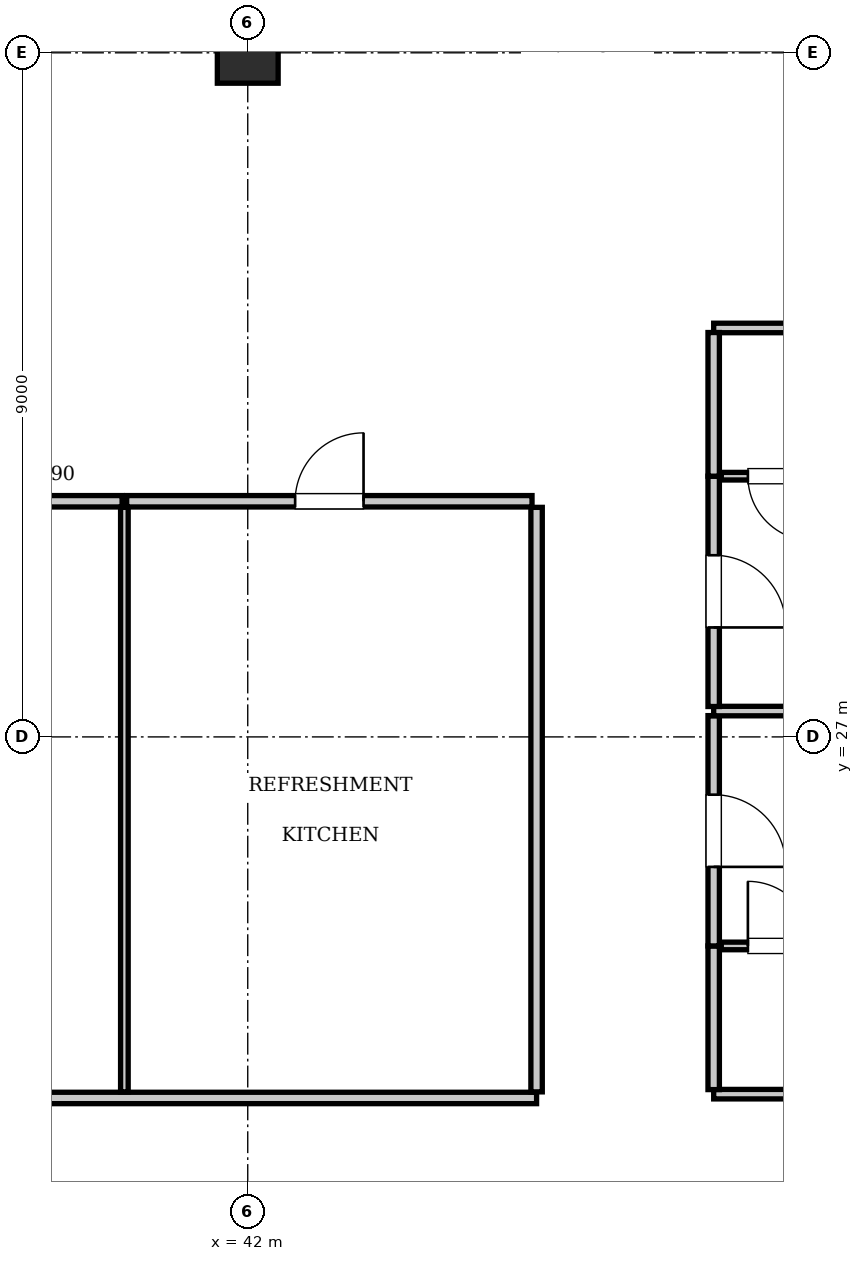
"""IFC4 building model, lengths in metres.
Left out: names, types, materials, properties, quantities, classifications, styles, units other than length and angle.
Written with IfcOpenShell. Run it as: python <this file> out.ifc"""

import sys

from ifc_helpers import new_model, si_unit, direction, frame, frame_2d, origin, origin_2d, place, context, subcontext, project, spatial, rectangle, extrude, element, fill, save


model = new_model("IFC4")
c1 = context("Model", 3, precision=1e-05, world=origin(), true_north=direction((0.0, 1.0)))
c2 = subcontext(c1, "Body", "Model", "MODEL_VIEW")
j1 = project(units=[si_unit("LENGTHUNIT", "METRE"), si_unit("PLANEANGLEUNIT", "RADIAN")], contexts=[c1])
p1 = place(None, origin())
s1 = spatial("IfcSite", under=j1, at=p1, CompositionType="ELEMENT")
p2 = place(p1, origin())
s2 = spatial("IfcBuilding", under=s1, at=p2, CompositionType="ELEMENT")
p3 = place(p2, frame((0.0, 0.0, 293.3)))
s3 = spatial("IfcBuildingStorey", under=s2, at=p3, CompositionType="ELEMENT", Elevation=293.3)
p4 = place(p3, frame((42.0, 36.0, 0.0), z_axis=(0.0, 0.0, 1.0), x_axis=(1.0, 0.0, 0.0)))
e1 = element("IfcColumn", 1, at=p4, inside=s3, PredefinedType="COLUMN", context=c2, shape_type="SweptSolid", body=[
    extrude(rectangle(XDim=0.8, YDim=0.8, at=origin_2d()), origin(), (0.0, 0.0, 1.0), 3.85),
])
p5 = place(p3, frame((29.85, 22.25, 0.0), z_axis=(0.0, 0.0, 1.0), x_axis=(1.0, 0.0, 0.0)))
e2 = element("IfcWall", 2, at=p5, inside=s3, PredefinedType="PARTITIONING", context=c2, shape_type="SweptSolid", body=[
    extrude(rectangle(XDim=15.95, YDim=0.15, at=frame_2d((7.975, 0.0))), origin(), (0.0, 0.0, 1.0), 3.61),
])
p6 = place(p3, frame((45.8, 22.33, 0.0), z_axis=(0.0, 0.0, 1.0), x_axis=(0.0, 1.0, 0.0)))
e3 = element("IfcWall", 3, at=p6, inside=s3, PredefinedType="PARTITIONING", context=c2, shape_type="SweptSolid", body=[
    extrude(rectangle(XDim=7.69, YDim=0.15, at=frame_2d((3.845, 0.0))), origin(), (0.0, 0.0, 1.0), 3.61),
])
p7 = place(p3, frame((35.941, 30.1, 0.0), z_axis=(0.0, 0.0, 1.0), x_axis=(1.0, 0.0, 0.0)))
e4 = element("IfcWall", 4, at=p7, inside=s3, PredefinedType="PARTITIONING", context=c2, shape_type="SweptSolid", body=[
    extrude(rectangle(XDim=4.406, YDim=0.15, at=frame_2d((2.203, 0.0))), origin(), (0.0, 0.0, 1.0), 3.61),
])
p8 = place(p7, frame((1.753, 0.0, 0.0)))
e5 = element("IfcOpeningElement", 5, at=p8, cuts=e4, PredefinedType="OPENING", context=c2, shape_type="SweptSolid", body=[
    extrude(rectangle(XDim=0.9, YDim=2.1, at=frame_2d((0.45, 1.05))), frame((0.0, 0.085, 0.0), z_axis=(0.0, -1.0, 0.0), x_axis=(1.0, 0.0, 0.0)), (0.0, 0.0, 1.0), 0.17),
])
p9 = place(p3, frame((40.377, 22.33, 0.0), z_axis=(0.0, 0.0, 1.0), x_axis=(0.0, 1.0, 0.0)))
e6 = element("IfcWall", 6, at=p9, inside=s3, PredefinedType="PARTITIONING", context=c2, shape_type="SweptSolid", body=[
    extrude(rectangle(XDim=7.69, YDim=0.1, at=frame_2d((3.845, 0.0))), origin(), (0.0, 0.0, 1.0), 3.61),
])
p10 = place(p3, frame((40.407, 30.1, 0.0), z_axis=(0.0, 0.0, 1.0), x_axis=(1.0, 0.0, 0.0)))
e7 = element("IfcWall", 7, at=p10, inside=s3, PredefinedType="PARTITIONING", context=c2, shape_type="SweptSolid", body=[
    extrude(rectangle(XDim=5.333, YDim=0.15, at=frame_2d((2.667, 0.0))), origin(), (0.0, 0.0, 1.0), 3.61),
])
p11 = place(p10, frame((2.217, 0.0, 0.0)))
e8 = element("IfcOpeningElement", 8, at=p11, cuts=e7, PredefinedType="OPENING", context=c2, shape_type="SweptSolid", body=[
    extrude(rectangle(XDim=0.9, YDim=2.1, at=frame_2d((0.45, 1.05))), frame((0.0, 0.085, 0.0), z_axis=(0.0, -1.0, 0.0), x_axis=(1.0, 0.0, 0.0)), (0.0, 0.0, 1.0), 0.17),
])
for number, where, z_axis, x_axis in (
    (9, (48.13, 22.3, 0.0), (0.0, 0.0, 1.0), (1.0, 0.0, 0.0)),
    (10, (48.13, 32.38, 0.0), (0.0, 0.0, 1.0), (1.0, 0.0, 0.0)),
):
    element("IfcWall", number, at=place(p3, frame(where, z_axis=z_axis, x_axis=x_axis)), inside=s3, PredefinedType="PARTITIONING", context=c2, shape_type="SweptSolid", body=[
        extrude(rectangle(XDim=11.97, YDim=0.125, at=frame_2d((5.985, 0.0))), origin(), (0.0, 0.0, 1.0), 3.61),
    ])
p12 = place(p3, frame((48.13, 22.36, 0.0), z_axis=(0.0, 0.0, 1.0), x_axis=(0.0, 1.0, 0.0)))
e11 = element("IfcWall", 11, at=p12, inside=s3, PredefinedType="PARTITIONING", context=c2, shape_type="SweptSolid", body=[
    extrude(rectangle(XDim=1.89, YDim=0.15, at=frame_2d((0.945, 0.0))), origin(), (0.0, 0.0, 1.0), 3.61),
])
p13 = place(p3, frame((48.13, 24.25, 0.0), z_axis=(0.0, 0.0, 1.0), x_axis=(0.0, 1.0, 0.0)))
e12 = element("IfcWall", 12, at=p13, inside=s3, PredefinedType="PARTITIONING", context=c2, shape_type="SweptSolid", body=[
    extrude(rectangle(XDim=3.03, YDim=0.15, at=frame_2d((1.515, 0.0))), origin(), (0.0, 0.0, 1.0), 3.61),
])
p14 = place(p13, frame((1.04, 0.0, 0.0)))
e13 = element("IfcOpeningElement", 13, at=p14, cuts=e12, PredefinedType="OPENING", context=c2, shape_type="SweptSolid", body=[
    extrude(rectangle(XDim=0.95, YDim=2.15, at=frame_2d((0.475, 1.075))), frame((0.0, 0.085, 0.0), z_axis=(0.0, -1.0, 0.0), x_axis=(1.0, 0.0, 0.0)), (0.0, 0.0, 1.0), 0.17),
])
p15 = place(p3, frame((48.23, 24.25, 0.0), z_axis=(0.0, 0.0, 1.0), x_axis=(1.0, 0.0, 0.0)))
e14 = element("IfcWall", 14, at=p15, inside=s3, PredefinedType="PARTITIONING", context=c2, shape_type="SweptSolid", body=[
    extrude(rectangle(XDim=2.3, YDim=0.1, at=frame_2d((1.15, 0.0))), origin(), (0.0, 0.0, 1.0), 3.61),
])
p16 = place(p15, frame((0.35, 0.0, 0.0)))
e15 = element("IfcOpeningElement", 15, at=p16, cuts=e14, PredefinedType="OPENING", context=c2, shape_type="SweptSolid", body=[
    extrude(rectangle(XDim=0.85, YDim=2.1, at=frame_2d((0.425, 1.05))), frame((0.0, 0.06, 0.0), z_axis=(0.0, -1.0, 0.0), x_axis=(1.0, 0.0, 0.0)), (0.0, 0.0, 1.0), 0.12),
])
p17 = place(p3, frame((48.13, 27.34, 0.0), z_axis=(0.0, 0.0, 1.0), x_axis=(1.0, 0.0, 0.0)))
e16 = element("IfcWall", 16, at=p17, inside=s3, PredefinedType="PARTITIONING", context=c2, shape_type="SweptSolid", body=[
    extrude(rectangle(XDim=11.97, YDim=0.125, at=frame_2d((5.985, 0.0))), origin(), (0.0, 0.0, 1.0), 3.61),
])
p18 = place(p3, frame((48.13, 27.4, 0.0), z_axis=(0.0, 0.0, 1.0), x_axis=(0.0, 1.0, 0.0)))
e17 = element("IfcWall", 17, at=p18, inside=s3, PredefinedType="PARTITIONING", context=c2, shape_type="SweptSolid", body=[
    extrude(rectangle(XDim=3.03, YDim=0.15, at=frame_2d((1.515, 0.0))), origin(), (0.0, 0.0, 1.0), 3.61),
])
p19 = place(p18, frame((1.04, 0.0, 0.0)))
e18 = element("IfcOpeningElement", 18, at=p19, cuts=e17, PredefinedType="OPENING", context=c2, shape_type="SweptSolid", body=[
    extrude(rectangle(XDim=0.95, YDim=2.15, at=frame_2d((0.475, 1.075))), frame((0.0, 0.085, 0.0), z_axis=(0.0, -1.0, 0.0), x_axis=(1.0, 0.0, 0.0)), (0.0, 0.0, 1.0), 0.17),
])
p20 = place(p3, frame((48.13, 30.43, 0.0), z_axis=(0.0, 0.0, 1.0), x_axis=(0.0, 1.0, 0.0)))
e19 = element("IfcWall", 19, at=p20, inside=s3, PredefinedType="PARTITIONING", context=c2, shape_type="SweptSolid", body=[
    extrude(rectangle(XDim=1.89, YDim=0.15, at=frame_2d((0.945, 0.0))), origin(), (0.0, 0.0, 1.0), 3.61),
])
p21 = place(p3, frame((48.23, 30.43, 0.0), z_axis=(0.0, 0.0, 1.0), x_axis=(1.0, 0.0, 0.0)))
e20 = element("IfcWall", 20, at=p21, inside=s3, PredefinedType="PARTITIONING", context=c2, shape_type="SweptSolid", body=[
    extrude(rectangle(XDim=2.3, YDim=0.1, at=frame_2d((1.15, 0.0))), origin(), (0.0, 0.0, 1.0), 3.61),
])
p22 = place(p21, frame((0.35, 0.0, 0.0)))
e21 = element("IfcOpeningElement", 21, at=p22, cuts=e20, PredefinedType="OPENING", context=c2, shape_type="SweptSolid", body=[
    extrude(rectangle(XDim=0.85, YDim=2.1, at=frame_2d((0.425, 1.05))), frame((0.0, 0.06, 0.0), z_axis=(0.0, -1.0, 0.0), x_axis=(1.0, 0.0, 0.0)), (0.0, 0.0, 1.0), 0.12),
])
p23 = place(p11, origin())
e22 = element("IfcDoor", 22, at=p23, inside=s3, OperationType="SINGLE_SWING_RIGHT", PredefinedType="DOOR", context=c2, shape_type="SweptSolid", body=[
    extrude(rectangle(XDim=0.9, YDim=2.1, at=frame_2d((0.45, 1.05))), frame((0.0, 0.025, 0.0), z_axis=(0.0, -1.0, 0.0), x_axis=(1.0, 0.0, 0.0)), (0.0, 0.0, 1.0), 0.05),
])
fill(e8, e22)
p24 = place(p16, origin())
e23 = element("IfcDoor", 23, at=p24, inside=s3, OperationType="SINGLE_SWING_LEFT", PredefinedType="DOOR", context=c2, shape_type="SweptSolid", body=[
    extrude(rectangle(XDim=0.85, YDim=2.1, at=frame_2d((0.425, 1.05))), frame((0.0, 0.025, 0.0), z_axis=(0.0, -1.0, 0.0), x_axis=(1.0, 0.0, 0.0)), (0.0, 0.0, 1.0), 0.05),
])
fill(e15, e23)
p25 = place(p14, frame((0.95, 0.0, 0.0), z_axis=(0.0, 0.0, 1.0), x_axis=(-1.0, 0.0, 0.0)))
e24 = element("IfcDoor", 24, at=p25, inside=s3, OperationType="SINGLE_SWING_RIGHT", PredefinedType="DOOR", context=c2, shape_type="SweptSolid", body=[
    extrude(rectangle(XDim=0.95, YDim=2.15, at=frame_2d((0.475, 1.075))), frame((0.0, 0.025, 0.0), z_axis=(0.0, -1.0, 0.0), x_axis=(1.0, 0.0, 0.0)), (0.0, 0.0, 1.0), 0.05),
])
fill(e13, e24)
p26 = place(p22, frame((0.85, 0.0, 0.0), z_axis=(0.0, 0.0, 1.0), x_axis=(-1.0, 0.0, 0.0)))
e25 = element("IfcDoor", 25, at=p26, inside=s3, OperationType="SINGLE_SWING_LEFT", PredefinedType="DOOR", context=c2, shape_type="SweptSolid", body=[
    extrude(rectangle(XDim=0.85, YDim=2.1, at=frame_2d((0.425, 1.05))), frame((0.0, 0.025, 0.0), z_axis=(0.0, -1.0, 0.0), x_axis=(1.0, 0.0, 0.0)), (0.0, 0.0, 1.0), 0.05),
])
fill(e21, e25)
p27 = place(p19, frame((0.95, 0.0, 0.0), z_axis=(0.0, 0.0, 1.0), x_axis=(-1.0, 0.0, 0.0)))
e26 = element("IfcDoor", 26, at=p27, inside=s3, OperationType="SINGLE_SWING_RIGHT", PredefinedType="DOOR", context=c2, shape_type="SweptSolid", body=[
    extrude(rectangle(XDim=0.95, YDim=2.15, at=frame_2d((0.475, 1.075))), frame((0.0, 0.025, 0.0), z_axis=(0.0, -1.0, 0.0), x_axis=(1.0, 0.0, 0.0)), (0.0, 0.0, 1.0), 0.05),
])
fill(e18, e26)
save(model, sys.argv[1])
